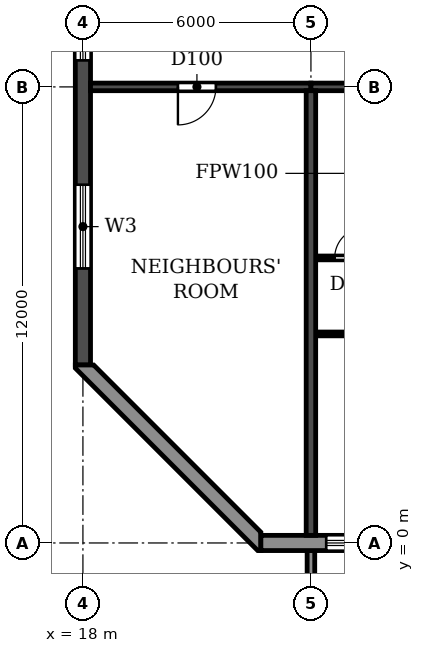
"""IFC4 building model, lengths in metres.
Left out: names, types, materials, properties, quantities, classifications, styles, units other than length and angle.
Written with IfcOpenShell. Run it as: python <this file> out.ifc"""

import sys

from ifc_helpers import new_model, si_unit, direction, frame, frame_2d, origin, place, context, subcontext, project, spatial, polyline, rectangle, outline, extrude, source, transform, mapped, element, fill, save


model = new_model("IFC4")
c1 = context("Model", 3, precision=1e-05, world=origin(), true_north=direction((0.0, 1.0)))
c2 = subcontext(c1, "Body", "Model", "MODEL_VIEW")
j1 = project(units=[si_unit("LENGTHUNIT", "METRE"), si_unit("PLANEANGLEUNIT", "RADIAN")], contexts=[c1])
p1 = place(None, origin())
s1 = spatial("IfcSite", under=j1, at=p1, CompositionType="ELEMENT")
p2 = place(p1, origin())
s2 = spatial("IfcBuilding", under=s1, at=p2, CompositionType="ELEMENT")
p3 = place(p2, frame((0.0, 0.0, 251.1)))
s3 = spatial("IfcBuildingStorey", under=s2, at=p3, CompositionType="ELEMENT", Elevation=251.1)
p4 = place(p3, frame((24.0, 0.2, 0.0), z_axis=(0.0, 0.0, 1.0), x_axis=(0.0, 1.0, 0.0)))
e1 = element("IfcWall", 1, at=p4, inside=s3, PredefinedType="SHEAR", context=c2, shape_type="SweptSolid", body=[
    extrude(rectangle(XDim=11.7, YDim=0.25, at=frame_2d((5.85, 0.0))), origin(), (0.0, 0.0, 1.0), 3.08),
])
p5 = place(p3, frame((18.0, 4.683, 0.0), z_axis=(0.0, 0.0, 1.0), x_axis=(0.0, 1.0, 0.0)))
e2 = element("IfcWall", 2, at=p5, inside=s3, PredefinedType="SHEAR", context=c2, shape_type="SweptSolid", body=[
    extrude(rectangle(XDim=31.834, YDim=0.4, at=frame_2d((15.917, 0.0))), origin(), (0.0, 0.0, 1.0), 3.08),
])
p6 = place(p5, frame((23.817, 0.0, 0.9)))
e3 = element("IfcOpeningElement", 3, at=p6, cuts=e2, PredefinedType="OPENING", context=c2, shape_type="SweptSolid", body=[
    extrude(rectangle(XDim=1.2, YDim=1.5, at=frame_2d((0.6, 0.75))), frame((0.0, 0.21, 0.0), z_axis=(0.0, -1.0, 0.0), x_axis=(1.0, 0.0, 0.0)), (0.0, 0.0, 1.0), 0.42),
])
p7 = place(p5, frame((8.017, 0.0, 0.9)))
e4 = element("IfcOpeningElement", 4, at=p7, cuts=e2, PredefinedType="OPENING", context=c2, shape_type="SweptSolid", body=[
    extrude(rectangle(XDim=1.2, YDim=1.5, at=frame_2d((0.6, 0.75))), frame((0.0, 0.21, 0.0), z_axis=(0.0, -1.0, 0.0), x_axis=(1.0, 0.0, 0.0)), (0.0, 0.0, 1.0), 0.42),
])
p8 = place(p5, frame((27.694, 0.0, 0.6)))
e5 = element("IfcOpeningElement", 5, at=p8, cuts=e2, PredefinedType="OPENING", context=c2, shape_type="SweptSolid", body=[
    extrude(rectangle(XDim=2.2, YDim=1.8, at=frame_2d((1.1, 0.9))), frame((0.0, 0.21, 0.0), z_axis=(0.0, -1.0, 0.0), x_axis=(1.0, 0.0, 0.0)), (0.0, 0.0, 1.0), 0.42),
])
p9 = place(p5, frame((2.541, 0.0, 0.6)))
e6 = element("IfcOpeningElement", 6, at=p9, cuts=e2, PredefinedType="OPENING", context=c2, shape_type="SweptSolid", body=[
    extrude(rectangle(XDim=2.2, YDim=1.8, at=frame_2d((1.1, 0.9))), frame((0.0, 0.21, 0.0), z_axis=(0.0, -1.0, 0.0), x_axis=(1.0, 0.0, 0.0)), (0.0, 0.0, 1.0), 0.42),
])
p10 = place(p5, frame((15.917, 0.0, 0.9)))
e7 = element("IfcOpeningElement", 7, at=p10, cuts=e2, PredefinedType="OPENING", context=c2, shape_type="SweptSolid", body=[
    extrude(rectangle(XDim=1.2, YDim=1.5, at=frame_2d((0.6, 0.75))), frame((0.0, 0.21, 0.0), z_axis=(0.0, -1.0, 0.0), x_axis=(1.0, 0.0, 0.0)), (0.0, 0.0, 1.0), 0.42),
])
p11 = place(p3, frame((18.2, 12.0, 0.0), z_axis=(0.0, 0.0, 1.0), x_axis=(1.0, 0.0, 0.0)))
e8 = element("IfcWall", 8, at=p11, inside=s3, PredefinedType="SHEAR", context=c2, shape_type="SweptSolid", body=[
    extrude(rectangle(XDim=5.8, YDim=0.2, at=frame_2d((2.9, 0.0))), origin(), (0.0, 0.0, 1.0), 2.48),
])
p12 = place(p11, frame((2.3, 0.0, 0.0)))
e9 = element("IfcOpeningElement", 9, at=p12, cuts=e8, PredefinedType="OPENING", context=c2, shape_type="SweptSolid", body=[
    extrude(rectangle(XDim=1.0, YDim=2.1, at=frame_2d((0.5, 1.05))), frame((0.0, 0.11, 0.0), z_axis=(0.0, -1.0, 0.0), x_axis=(1.0, 0.0, 0.0)), (0.0, 0.0, 1.0), 0.22),
])
p13 = place(p3, frame((24.0, 12.0, 0.0), z_axis=(0.0, 0.0, 1.0), x_axis=(1.0, 0.0, 0.0)))
e10 = element("IfcWall", 10, at=p13, inside=s3, PredefinedType="SHEAR", context=c2, shape_type="SweptSolid", body=[
    extrude(rectangle(XDim=6.0, YDim=0.2, at=frame_2d((3.0, 0.0))), origin(), (0.0, 0.0, 1.0), 2.48),
])
p14 = place(p13, frame((2.45, 0.0, 0.0)))
e11 = element("IfcOpeningElement", 11, at=p14, cuts=e10, PredefinedType="OPENING", context=c2, shape_type="SweptSolid", body=[
    extrude(rectangle(XDim=1.0, YDim=2.1, at=frame_2d((0.5, 1.05))), frame((0.0, 0.11, 0.0), z_axis=(0.0, -1.0, 0.0), x_axis=(1.0, 0.0, 0.0)), (0.0, 0.0, 1.0), 0.22),
])
p15 = place(p3, frame((22.683, 0.0, 0.0), z_axis=(0.0, 0.0, 1.0), x_axis=(1.0, 0.0, 0.0)))
e12 = element("IfcWall", 12, at=p15, inside=s3, PredefinedType="STANDARD", context=c2, shape_type="SweptSolid", body=[
    extrude(rectangle(XDim=56.634, YDim=0.4, at=frame_2d((28.317, 0.0))), origin(), (0.0, 0.0, 1.0), 3.08),
])
p16 = place(p15, frame((1.717, 0.0, 0.9)))
e13 = element("IfcOpeningElement", 13, at=p16, cuts=e12, PredefinedType="OPENING", context=c2, shape_type="SweptSolid", body=[
    extrude(rectangle(XDim=2.2, YDim=1.5, at=frame_2d((1.1, 0.75))), frame((0.0, 0.21, 0.0), z_axis=(0.0, -1.0, 0.0), x_axis=(1.0, 0.0, 0.0)), (0.0, 0.0, 1.0), 0.42),
])
p17 = place(p15, frame((4.917, 0.0, 0.0)))
e14 = element("IfcOpeningElement", 14, at=p17, cuts=e12, PredefinedType="OPENING", context=c2, shape_type="SweptSolid", body=[
    extrude(rectangle(XDim=1.8, YDim=2.4, at=frame_2d((0.9, 1.2))), frame((0.0, 0.21, 0.0), z_axis=(0.0, -1.0, 0.0), x_axis=(1.0, 0.0, 0.0)), (0.0, 0.0, 1.0), 0.42),
])
p18 = place(p15, frame((7.717, 0.0, 0.9)))
e15 = element("IfcOpeningElement", 15, at=p18, cuts=e12, PredefinedType="OPENING", context=c2, shape_type="SweptSolid", body=[
    extrude(rectangle(XDim=2.2, YDim=1.5, at=frame_2d((1.1, 0.75))), frame((0.0, 0.21, 0.0), z_axis=(0.0, -1.0, 0.0), x_axis=(1.0, 0.0, 0.0)), (0.0, 0.0, 1.0), 0.42),
])
p19 = place(p15, frame((10.717, 0.0, 0.9)))
e16 = element("IfcOpeningElement", 16, at=p19, cuts=e12, PredefinedType="OPENING", context=c2, shape_type="SweptSolid", body=[
    extrude(rectangle(XDim=2.2, YDim=1.5, at=frame_2d((1.1, 0.75))), frame((0.0, 0.21, 0.0), z_axis=(0.0, -1.0, 0.0), x_axis=(1.0, 0.0, 0.0)), (0.0, 0.0, 1.0), 0.42),
])
p20 = place(p15, frame((13.717, 0.0, 0.9)))
e17 = element("IfcOpeningElement", 17, at=p20, cuts=e12, PredefinedType="OPENING", context=c2, shape_type="SweptSolid", body=[
    extrude(rectangle(XDim=2.2, YDim=1.5, at=frame_2d((1.1, 0.75))), frame((0.0, 0.21, 0.0), z_axis=(0.0, -1.0, 0.0), x_axis=(1.0, 0.0, 0.0)), (0.0, 0.0, 1.0), 0.42),
])
p21 = place(p15, frame((16.917, 0.0, 0.0)))
e18 = element("IfcOpeningElement", 18, at=p21, cuts=e12, PredefinedType="OPENING", context=c2, shape_type="SweptSolid", body=[
    extrude(rectangle(XDim=1.8, YDim=2.4, at=frame_2d((0.9, 1.2))), frame((0.0, 0.21, 0.0), z_axis=(0.0, -1.0, 0.0), x_axis=(1.0, 0.0, 0.0)), (0.0, 0.0, 1.0), 0.42),
])
p22 = place(p15, frame((19.717, 0.0, 0.9)))
e19 = element("IfcOpeningElement", 19, at=p22, cuts=e12, PredefinedType="OPENING", context=c2, shape_type="SweptSolid", body=[
    extrude(rectangle(XDim=2.2, YDim=1.5, at=frame_2d((1.1, 0.75))), frame((0.0, 0.21, 0.0), z_axis=(0.0, -1.0, 0.0), x_axis=(1.0, 0.0, 0.0)), (0.0, 0.0, 1.0), 0.42),
])
p23 = place(p15, frame((22.717, 0.0, 0.9)))
e20 = element("IfcOpeningElement", 20, at=p23, cuts=e12, PredefinedType="OPENING", context=c2, shape_type="SweptSolid", body=[
    extrude(rectangle(XDim=2.2, YDim=1.5, at=frame_2d((1.1, 0.75))), frame((0.0, 0.21, 0.0), z_axis=(0.0, -1.0, 0.0), x_axis=(1.0, 0.0, 0.0)), (0.0, 0.0, 1.0), 0.42),
])
p24 = place(p15, frame((25.717, 0.0, 0.9)))
e21 = element("IfcOpeningElement", 21, at=p24, cuts=e12, PredefinedType="OPENING", context=c2, shape_type="SweptSolid", body=[
    extrude(rectangle(XDim=2.2, YDim=1.5, at=frame_2d((1.1, 0.75))), frame((0.0, 0.21, 0.0), z_axis=(0.0, -1.0, 0.0), x_axis=(1.0, 0.0, 0.0)), (0.0, 0.0, 1.0), 0.42),
])
p25 = place(p15, frame((28.917, 0.0, 0.0)))
e22 = element("IfcOpeningElement", 22, at=p25, cuts=e12, PredefinedType="OPENING", context=c2, shape_type="SweptSolid", body=[
    extrude(rectangle(XDim=1.8, YDim=2.4, at=frame_2d((0.9, 1.2))), frame((0.0, 0.21, 0.0), z_axis=(0.0, -1.0, 0.0), x_axis=(1.0, 0.0, 0.0)), (0.0, 0.0, 1.0), 0.42),
])
p26 = place(p15, frame((31.717, 0.0, 0.9)))
e23 = element("IfcOpeningElement", 23, at=p26, cuts=e12, PredefinedType="OPENING", context=c2, shape_type="SweptSolid", body=[
    extrude(rectangle(XDim=2.2, YDim=1.5, at=frame_2d((1.1, 0.75))), frame((0.0, 0.21, 0.0), z_axis=(0.0, -1.0, 0.0), x_axis=(1.0, 0.0, 0.0)), (0.0, 0.0, 1.0), 0.42),
])
p27 = place(p15, frame((34.717, 0.0, 0.9)))
e24 = element("IfcOpeningElement", 24, at=p27, cuts=e12, PredefinedType="OPENING", context=c2, shape_type="SweptSolid", body=[
    extrude(rectangle(XDim=2.2, YDim=1.5, at=frame_2d((1.1, 0.75))), frame((0.0, 0.21, 0.0), z_axis=(0.0, -1.0, 0.0), x_axis=(1.0, 0.0, 0.0)), (0.0, 0.0, 1.0), 0.42),
])
p28 = place(p15, frame((37.717, 0.0, 0.9)))
e25 = element("IfcOpeningElement", 25, at=p28, cuts=e12, PredefinedType="OPENING", context=c2, shape_type="SweptSolid", body=[
    extrude(rectangle(XDim=2.2, YDim=1.5, at=frame_2d((1.1, 0.75))), frame((0.0, 0.21, 0.0), z_axis=(0.0, -1.0, 0.0), x_axis=(1.0, 0.0, 0.0)), (0.0, 0.0, 1.0), 0.42),
])
p29 = place(p15, frame((40.917, 0.0, 0.0)))
e26 = element("IfcOpeningElement", 26, at=p29, cuts=e12, PredefinedType="OPENING", context=c2, shape_type="SweptSolid", body=[
    extrude(rectangle(XDim=1.8, YDim=2.4, at=frame_2d((0.9, 1.2))), frame((0.0, 0.21, 0.0), z_axis=(0.0, -1.0, 0.0), x_axis=(1.0, 0.0, 0.0)), (0.0, 0.0, 1.0), 0.42),
])
p30 = place(p15, frame((43.717, 0.0, 0.9)))
e27 = element("IfcOpeningElement", 27, at=p30, cuts=e12, PredefinedType="OPENING", context=c2, shape_type="SweptSolid", body=[
    extrude(rectangle(XDim=2.2, YDim=1.5, at=frame_2d((1.1, 0.75))), frame((0.0, 0.21, 0.0), z_axis=(0.0, -1.0, 0.0), x_axis=(1.0, 0.0, 0.0)), (0.0, 0.0, 1.0), 0.42),
])
p31 = place(p15, frame((46.717, 0.0, 0.9)))
e28 = element("IfcOpeningElement", 28, at=p31, cuts=e12, PredefinedType="OPENING", context=c2, shape_type="SweptSolid", body=[
    extrude(rectangle(XDim=2.2, YDim=1.5, at=frame_2d((1.1, 0.75))), frame((0.0, 0.21, 0.0), z_axis=(0.0, -1.0, 0.0), x_axis=(1.0, 0.0, 0.0)), (0.0, 0.0, 1.0), 0.42),
])
p32 = place(p15, frame((49.717, 0.0, 0.9)))
e29 = element("IfcOpeningElement", 29, at=p32, cuts=e12, PredefinedType="OPENING", context=c2, shape_type="SweptSolid", body=[
    extrude(rectangle(XDim=2.2, YDim=1.5, at=frame_2d((1.1, 0.75))), frame((0.0, 0.21, 0.0), z_axis=(0.0, -1.0, 0.0), x_axis=(1.0, 0.0, 0.0)), (0.0, 0.0, 1.0), 0.42),
])
p33 = place(p15, frame((52.917, 0.0, 0.0)))
e30 = element("IfcOpeningElement", 30, at=p33, cuts=e12, PredefinedType="OPENING", context=c2, shape_type="SweptSolid", body=[
    extrude(rectangle(XDim=1.8, YDim=2.4, at=frame_2d((0.9, 1.2))), frame((0.0, 0.21, 0.0), z_axis=(0.0, -1.0, 0.0), x_axis=(1.0, 0.0, 0.0)), (0.0, 0.0, 1.0), 0.42),
])
p34 = place(p3, origin())
e31 = element("IfcWall", 31, at=p34, inside=s3, PredefinedType="STANDARD", context=c2, shape_type="SweptSolid", body=[
    extrude(outline(polyline([(17.8, 4.683), (17.8, 4.6), (22.6, -0.2), (22.683, -0.2), (22.683, 0.283), (18.283, 4.683), (17.8, 4.683)])), origin(), (0.0, 0.0, 1.0), 3.08),
])
m1 = source(origin(), c2, "Body", "SweptSolid", [
    extrude(outline(polyline([(0.0, 0.0), (0.2, 0.0), (0.2, 1.65), (0.0, 1.65), (0.0, 0.0)])), origin(), (0.0, 0.0, 1.0), 3.1),
])
p35 = place(p3, frame((23.9, -1.85, 0.0)))
e32 = element("IfcWall", 32, at=p35, inside=s3, PredefinedType="STANDARD", context=c2, shape_type="MappedRepresentation", body=[
    mapped(m1, transform((0.0, 0.0, 0.0))),
])
p36 = place(p3, frame((24.135, 5.5, 0.0), z_axis=(0.0, 0.0, 1.0), x_axis=(1.0, 0.0, 0.0)))
e33 = element("IfcWall", 33, at=p36, inside=s3, PredefinedType="PARTITIONING", context=c2, shape_type="SweptSolid", body=[
    extrude(rectangle(XDim=2.915, YDim=0.1, at=frame_2d((1.458, 0.0))), origin(), (0.0, 0.0, 1.0), 3.08),
])
p37 = place(p36, frame((1.465, 0.0, 0.0)))
e34 = element("IfcOpeningElement", 34, at=p37, cuts=e33, PredefinedType="OPENING", context=c2, shape_type="SweptSolid", body=[
    extrude(rectangle(XDim=0.9, YDim=2.1, at=frame_2d((0.45, 1.05))), frame((0.0, 0.06, 0.0), z_axis=(0.0, -1.0, 0.0), x_axis=(1.0, 0.0, 0.0)), (0.0, 0.0, 1.0), 0.12),
])
p38 = place(p3, frame((24.135, 7.5, 0.0), z_axis=(0.0, 0.0, 1.0), x_axis=(1.0, 0.0, 0.0)))
e35 = element("IfcWall", 35, at=p38, inside=s3, PredefinedType="PARTITIONING", context=c2, shape_type="SweptSolid", body=[
    extrude(rectangle(XDim=1.965, YDim=0.1, at=frame_2d((0.982, 0.0))), origin(), (0.0, 0.0, 1.0), 3.08),
])
p39 = place(p38, frame((0.49, 0.0, 0.0)))
e36 = element("IfcOpeningElement", 36, at=p39, cuts=e35, PredefinedType="OPENING", context=c2, shape_type="SweptSolid", body=[
    extrude(rectangle(XDim=0.8, YDim=2.1, at=frame_2d((0.4, 1.05))), frame((0.0, 0.06, 0.0), z_axis=(0.0, -1.0, 0.0), x_axis=(1.0, 0.0, 0.0)), (0.0, 0.0, 1.0), 0.12),
])
p40 = place(p16, origin())
e37 = element("IfcWindow", 37, at=p40, inside=s3, PartitioningType="DOUBLE_PANEL_HORIZONTAL", PredefinedType="WINDOW", context=c2, shape_type="SweptSolid", body=[
    extrude(rectangle(XDim=2.2, YDim=1.5, at=frame_2d((1.1, 0.75))), frame((0.0, 0.03, 0.0), z_axis=(0.0, -1.0, 0.0), x_axis=(1.0, 0.0, 0.0)), (0.0, 0.0, 1.0), 0.06),
])
fill(e13, e37)
p41 = place(p7, origin())
e38 = element("IfcWindow", 38, at=p41, inside=s3, PartitioningType="SINGLE_PANEL", PredefinedType="WINDOW", context=c2, shape_type="SweptSolid", body=[
    extrude(rectangle(XDim=1.2, YDim=1.5, at=frame_2d((0.6, 0.75))), frame((0.0, 0.03, 0.0), z_axis=(0.0, -1.0, 0.0), x_axis=(1.0, 0.0, 0.0)), (0.0, 0.0, 1.0), 0.06),
])
fill(e4, e38)
p42 = place(p9, origin())
e39 = element("IfcWindow", 39, at=p42, inside=s3, PartitioningType="DOUBLE_PANEL_HORIZONTAL", PredefinedType="WINDOW", context=c2, shape_type="SweptSolid", body=[
    extrude(rectangle(XDim=2.2, YDim=1.8, at=frame_2d((1.1, 0.9))), frame((0.0, 0.03, 0.0), z_axis=(0.0, -1.0, 0.0), x_axis=(1.0, 0.0, 0.0)), (0.0, 0.0, 1.0), 0.06),
])
fill(e6, e39)
p43 = place(p12, frame((1.0, 0.0, 0.0), z_axis=(0.0, 0.0, 1.0), x_axis=(-1.0, 0.0, 0.0)))
e40 = element("IfcDoor", 40, at=p43, inside=s3, OperationType="SINGLE_SWING_RIGHT", PredefinedType="DOOR", context=c2, shape_type="SweptSolid", body=[
    extrude(rectangle(XDim=1.0, YDim=2.1, at=frame_2d((0.5, 1.05))), frame((0.0, 0.025, 0.0), z_axis=(0.0, -1.0, 0.0), x_axis=(1.0, 0.0, 0.0)), (0.0, 0.0, 1.0), 0.05),
])
fill(e9, e40)
p44 = place(p39, origin())
e41 = element("IfcDoor", 41, at=p44, inside=s3, OperationType="SINGLE_SWING_RIGHT", PredefinedType="DOOR", context=c2, shape_type="SweptSolid", body=[
    extrude(rectangle(XDim=0.8, YDim=2.1, at=frame_2d((0.4, 1.05))), frame((0.0, 0.025, 0.0), z_axis=(0.0, -1.0, 0.0), x_axis=(1.0, 0.0, 0.0)), (0.0, 0.0, 1.0), 0.05),
])
fill(e36, e41)
save(model, sys.argv[1])
